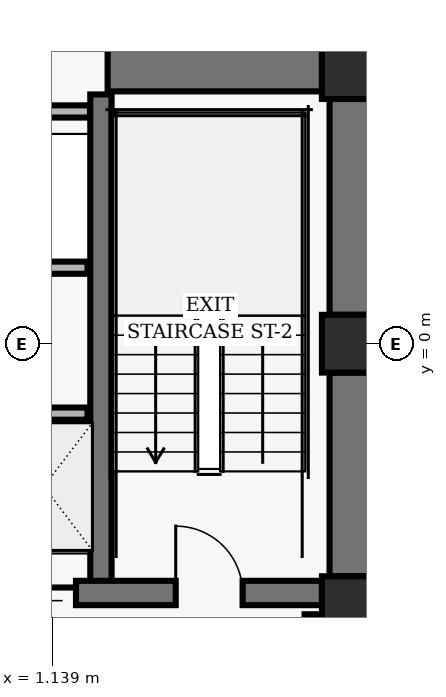
"""IFC4 building model, lengths in metres.
Left out: names, types, materials, properties, quantities, classifications, styles, units other than length and angle.
Written with IfcOpenShell. Run it as: python <this file> out.ifc"""

import sys

from ifc_helpers import new_model, si_unit, direction, frame, frame_2d, origin, origin_2d, place, context, subcontext, project, spatial, rectangle, hollow_rectangle, extrude, element, fill, save


model = new_model("IFC4")
c1 = context("Model", 3, precision=1e-05, world=origin(), true_north=direction((0.0, 1.0)))
c2 = subcontext(c1, "Body", "Model", "MODEL_VIEW")
j1 = project(units=[si_unit("LENGTHUNIT", "METRE"), si_unit("PLANEANGLEUNIT", "RADIAN")], contexts=[c1])
p1 = place(None, origin())
s1 = spatial("IfcSite", under=j1, at=p1, CompositionType="ELEMENT")
p2 = place(p1, origin())
s2 = spatial("IfcBuilding", under=s1, at=p2, CompositionType="ELEMENT")
p3 = place(p2, frame((0.0, 0.0, 91.68)))
s3 = spatial("IfcBuildingStorey", under=s2, at=p3, CompositionType="ELEMENT", Elevation=91.68)
for number, where, z_axis, x_axis in (
    (1, (6.05, 4.5, 0.0), (0.0, 0.0, 1.0), (1.0, 0.0, 0.0)),
    (2, (6.05, 0.0, 0.0), (0.0, 0.0, 1.0), (1.0, 0.0, 0.0)),
    (3, (6.05, -4.3, 0.0), (0.0, 0.0, 1.0), (1.0, 0.0, 0.0)),
):
    element("IfcColumn", number, at=place(p3, frame(where, z_axis=z_axis, x_axis=x_axis)), inside=s3, PredefinedType="COLUMN", context=c2, shape_type="SweptSolid", body=[
        extrude(hollow_rectangle(XDim=0.95, YDim=0.95, WallThickness=0.06, InnerFilletRadius=0.02, OuterFilletRadius=0.04, at=origin_2d()), origin(), (0.0, 0.0, 1.0), 3.04),
    ])
p4 = place(p3, frame((6.05, 0.475, 0.0), z_axis=(0.0, 0.0, 1.0), x_axis=(0.0, 1.0, 0.0)))
e4 = element("IfcWall", 4, at=p4, inside=s3, PredefinedType="SHEAR", context=c2, shape_type="SweptSolid", body=[
    extrude(rectangle(XDim=3.55, YDim=0.7, at=frame_2d((1.775, 0.0))), origin(), (0.0, 0.0, 1.0), 2.788),
])
p5 = place(p3, frame((6.05, -3.825, 0.0), z_axis=(0.0, 0.0, 1.0), x_axis=(0.0, 1.0, 0.0)))
e5 = element("IfcWall", 5, at=p5, inside=s3, PredefinedType="SHEAR", context=c2, shape_type="SweptSolid", body=[
    extrude(rectangle(XDim=3.35, YDim=0.7, at=frame_2d((1.675, 0.0))), origin(), (0.0, 0.0, 1.0), 2.788),
])
p6 = place(p3, frame((1.94, -4.1, 0.0), z_axis=(0.0, 0.0, 1.0), x_axis=(0.0, 1.0, 0.0)))
e6 = element("IfcWall", 6, at=p6, inside=s3, PredefinedType="SHEAR", context=c2, shape_type="SweptSolid", body=[
    extrude(rectangle(XDim=8.2, YDim=0.35, at=frame_2d((4.1, 0.0))), origin(), (0.0, 0.0, 1.0), 2.788),
])
p7 = place(p3, frame((-5.575, -4.1, 0.0), z_axis=(0.0, 0.0, 1.0), x_axis=(1.0, 0.0, 0.0)))
e7 = element("IfcWall", 7, at=p7, inside=s3, PredefinedType="SHEAR", context=c2, shape_type="SweptSolid", body=[
    extrude(rectangle(XDim=11.15, YDim=0.4, at=frame_2d((5.575, 0.0))), origin(), (0.0, 0.0, 1.0), 2.788),
])
p8 = place(p7, frame((1.305, 0.0, 0.0)))
e8 = element("IfcOpeningElement", 8, at=p8, cuts=e7, PredefinedType="OPENING", context=c2, shape_type="SweptSolid", body=[
    extrude(rectangle(XDim=1.1, YDim=2.04, at=frame_2d((0.55, 1.02))), frame((0.0, 0.21, 0.0), z_axis=(0.0, -1.0, 0.0), x_axis=(1.0, 0.0, 0.0)), (0.0, 0.0, 1.0), 0.42),
])
p9 = place(p7, frame((8.745, 0.0, 0.0)))
e9 = element("IfcOpeningElement", 9, at=p9, cuts=e7, PredefinedType="OPENING", context=c2, shape_type="SweptSolid", body=[
    extrude(rectangle(XDim=1.1, YDim=2.04, at=frame_2d((0.55, 1.02))), frame((0.0, 0.21, 0.0), z_axis=(0.0, -1.0, 0.0), x_axis=(1.0, 0.0, 0.0)), (0.0, 0.0, 1.0), 0.42),
])
p10 = place(p7, frame((4.045, 0.0, 0.0)))
e10 = element("IfcOpeningElement", 10, at=p10, cuts=e7, PredefinedType="OPENING", context=c2, shape_type="SweptSolid", body=[
    extrude(rectangle(XDim=1.06, YDim=2.04, at=frame_2d((0.53, 1.02))), frame((0.0, 0.21, 0.0), z_axis=(0.0, -1.0, 0.0), x_axis=(1.0, 0.0, 0.0)), (0.0, 0.0, 1.0), 0.42),
])
p11 = place(p7, frame((6.045, 0.0, 0.0)))
e11 = element("IfcOpeningElement", 11, at=p11, cuts=e7, PredefinedType="OPENING", context=c2, shape_type="SweptSolid", body=[
    extrude(rectangle(XDim=1.06, YDim=2.04, at=frame_2d((0.53, 1.02))), frame((0.0, 0.21, 0.0), z_axis=(0.0, -1.0, 0.0), x_axis=(1.0, 0.0, 0.0)), (0.0, 0.0, 1.0), 0.42),
])
p12 = place(p3, frame((2.05, 4.5, 0.0), z_axis=(0.0, 0.0, 1.0), x_axis=(1.0, 0.0, 0.0)))
e12 = element("IfcWall", 12, at=p12, inside=s3, PredefinedType="SHEAR", context=c2, shape_type="SweptSolid", body=[
    extrude(rectangle(XDim=3.525, YDim=0.7, at=frame_2d((1.762, 0.0))), origin(), (0.0, 0.0, 1.0), 2.788),
])
p13 = place(p3, frame((-1.72, -1.15, 0.0), z_axis=(0.0, 0.0, 1.0), x_axis=(1.0, 0.0, 0.0)))
e13 = element("IfcWall", 13, at=p13, inside=s3, PredefinedType="PARTITIONING", context=c2, shape_type="SweptSolid", body=[
    extrude(rectangle(XDim=3.44, YDim=0.2, at=frame_2d((1.72, 0.0))), origin(), (0.0, 0.0, 1.0), 2.763),
])
p14 = place(p3, frame((5.4, -7.16, 0.0), z_axis=(0.0, 0.0, 1.0), x_axis=(0.0, 1.0, 0.0)))
e14 = element("IfcWall", 14, at=p14, inside=s3, PredefinedType="PARTITIONING", context=c2, shape_type="SweptSolid", body=[
    extrude(rectangle(XDim=2.71, YDim=0.22, at=frame_2d((1.355, 0.0))), origin(), (0.0, 0.0, 1.0), 2.763),
])
p15 = place(p3, frame((-1.72, 1.25, 0.0), z_axis=(0.0, 0.0, 1.0), x_axis=(1.0, 0.0, 0.0)))
e15 = element("IfcWall", 15, at=p15, inside=s3, PredefinedType="PARTITIONING", context=c2, shape_type="SweptSolid", body=[
    extrude(rectangle(XDim=3.44, YDim=0.2, at=frame_2d((1.72, 0.0))), origin(), (0.0, 0.0, 1.0), 2.763),
])
p16 = place(p3, frame((-1.76, 3.82, 0.0), z_axis=(0.0, 0.0, 1.0), x_axis=(1.0, 0.0, 0.0)))
e16 = element("IfcWall", 16, at=p16, inside=s3, PredefinedType="PARTITIONING", context=c2, shape_type="SweptSolid", body=[
    extrude(rectangle(XDim=3.52, YDim=0.2, at=frame_2d((1.76, 0.0))), origin(), (0.0, 0.0, 1.0), 2.763),
])
p17 = place(p9, origin())
e17 = element("IfcDoor", 17, at=p17, inside=s3, OperationType="SINGLE_SWING_LEFT", PredefinedType="DOOR", context=c2, shape_type="SweptSolid", body=[
    extrude(rectangle(XDim=1.1, YDim=2.04, at=frame_2d((0.55, 1.02))), frame((0.0, 0.025, 0.0), z_axis=(0.0, -1.0, 0.0), x_axis=(1.0, 0.0, 0.0)), (0.0, 0.0, 1.0), 0.05),
])
fill(e9, e17)
p18 = place(p11, origin())
e18 = element("IfcDoor", 18, at=p18, inside=s3, OperationType="SLIDING_TO_RIGHT", PredefinedType="DOOR", context=c2, shape_type="SweptSolid", body=[
    extrude(rectangle(XDim=1.06, YDim=2.04, at=frame_2d((0.53, 1.02))), frame((0.0, 0.025, 0.0), z_axis=(0.0, -1.0, 0.0), x_axis=(1.0, 0.0, 0.0)), (0.0, 0.0, 1.0), 0.05),
])
fill(e11, e18)
save(model, sys.argv[1])
